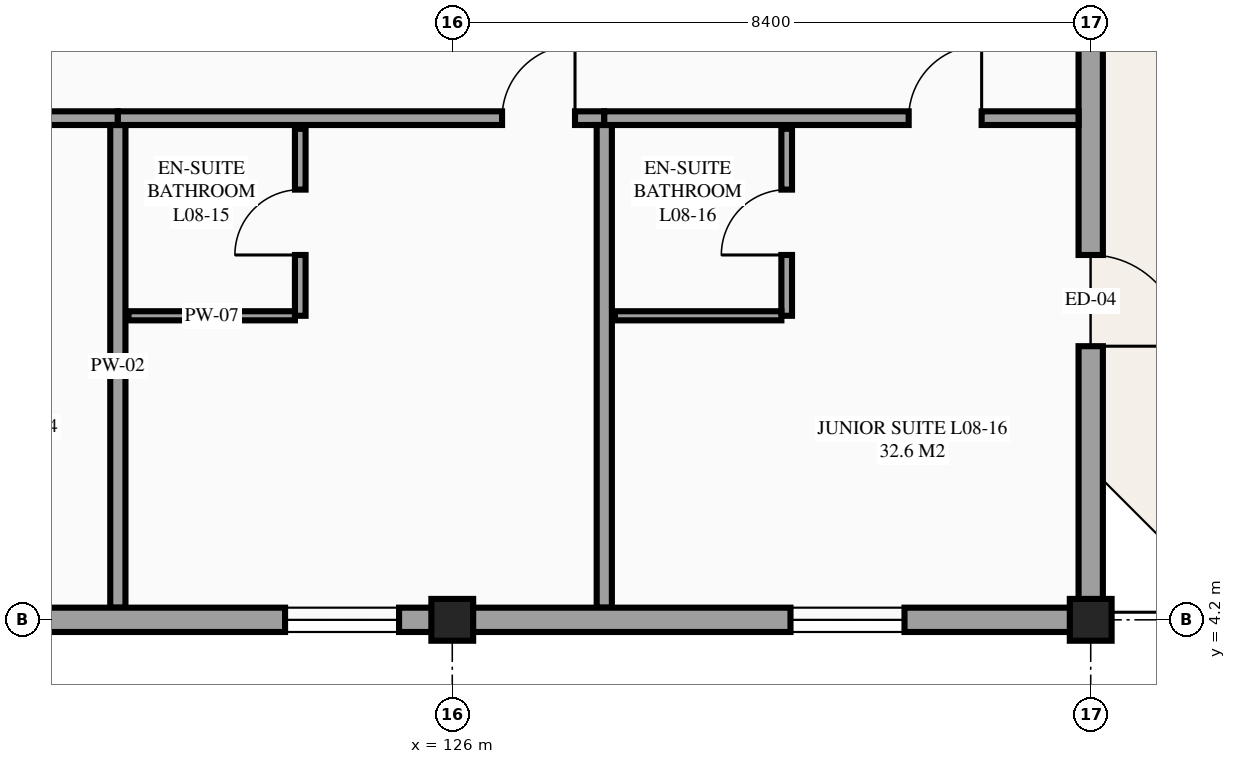
"""IFC4 building model, lengths in metres.
Left out: names, types, materials, properties, quantities, classifications, styles, units other than length and angle.
Written with IfcOpenShell. Run it as: python <this file> out.ifc"""

import sys

from ifc_helpers import new_model, si_unit, direction, frame, frame_2d, origin, origin_2d, place, context, subcontext, project, spatial, rectangle, extrude, element, fill, save


model = new_model("IFC4")
c1 = context("Model", 3, precision=1e-05, world=origin(), true_north=direction((0.0, 1.0)))
c2 = subcontext(c1, "Body", "Model", "MODEL_VIEW")
j1 = project(units=[si_unit("LENGTHUNIT", "METRE"), si_unit("PLANEANGLEUNIT", "RADIAN")], contexts=[c1])
p1 = place(None, origin())
s1 = spatial("IfcSite", under=j1, at=p1, CompositionType="ELEMENT")
p2 = place(p1, origin())
s2 = spatial("IfcBuilding", under=s1, at=p2, CompositionType="ELEMENT")
p3 = place(p2, frame((0.0, 0.0, 32.7)))
s3 = spatial("IfcBuildingStorey", under=s2, at=p3, CompositionType="ELEMENT", Elevation=32.7)
for number, where, z_axis, x_axis in (
    (1, (126.0, 4.2, 0.0), (0.0, 0.0, 1.0), (1.0, 0.0, 0.0)),
    (2, (134.4, 4.2, 0.0), (0.0, 0.0, 1.0), (1.0, 0.0, 0.0)),
):
    element("IfcColumn", number, at=place(p3, frame(where, z_axis=z_axis, x_axis=x_axis)), inside=s3, PredefinedType="COLUMN", context=c2, shape_type="SweptSolid", body=[
        extrude(rectangle(XDim=0.55, YDim=0.55, at=origin_2d()), origin(), (0.0, 0.0, 1.0), 3.6),
    ])
p4 = place(p3, frame((134.4, 4.2, 0.0), z_axis=(0.0, 0.0, 1.0), x_axis=(0.0, 1.0, 0.0)))
e3 = element("IfcWall", 3, at=p4, inside=s3, PredefinedType="STANDARD", context=c2, shape_type="SweptSolid", body=[
    extrude(rectangle(XDim=16.8, YDim=0.32, at=frame_2d((8.4, 0.0))), origin(), (0.0, 0.0, 1.0), 2.63),
])
p5 = place(p4, frame((4.8, 0.0, 0.0), z_axis=(0.0, 0.0, 1.0), x_axis=(-1.0, 0.0, 0.0)))
e4 = element("IfcOpeningElement", 4, at=p5, cuts=e3, PredefinedType="OPENING", context=c2, shape_type="SweptSolid", body=[
    extrude(rectangle(XDim=1.2, YDim=2.2, at=frame_2d((0.6, 1.1))), frame((0.0, 0.17, 0.0), z_axis=(0.0, -1.0, 0.0), x_axis=(1.0, 0.0, 0.0)), (0.0, 0.0, 1.0), 0.34),
])
p6 = place(p3, frame((115.2, 10.8, 0.0), z_axis=(0.0, 0.0, 1.0), x_axis=(1.0, 0.0, 0.0)))
e5 = element("IfcWall", 5, at=p6, inside=s3, PredefinedType="PARTITIONING", context=c2, shape_type="SweptSolid", body=[
    extrude(rectangle(XDim=6.4, YDim=0.18, at=frame_2d((3.2, 0.0))), origin(), (0.0, 0.0, 1.0), 3.375),
])
p7 = place(p6, frame((4.355, 0.0, 0.0)))
e6 = element("IfcOpeningElement", 6, at=p7, cuts=e5, PredefinedType="OPENING", context=c2, shape_type="SweptSolid", body=[
    extrude(rectangle(XDim=0.96, YDim=2.15, at=frame_2d((0.48, 1.075))), frame((0.0, 0.1, 0.0), z_axis=(0.0, -1.0, 0.0), x_axis=(1.0, 0.0, 0.0)), (0.0, 0.0, 1.0), 0.2),
])
p8 = place(p3, frame((121.6, 4.36, 0.0), z_axis=(0.0, 0.0, 1.0), x_axis=(0.0, 1.0, 0.0)))
e7 = element("IfcWall", 7, at=p8, inside=s3, PredefinedType="PARTITIONING", context=c2, shape_type="SweptSolid", body=[
    extrude(rectangle(XDim=6.35, YDim=0.2, at=frame_2d((3.175, 0.0))), origin(), (0.0, 0.0, 1.0), 3.375),
])
p9 = place(p3, frame((121.6, 10.8, 0.0), z_axis=(0.0, 0.0, 1.0), x_axis=(1.0, 0.0, 0.0)))
e8 = element("IfcWall", 8, at=p9, inside=s3, PredefinedType="PARTITIONING", context=c2, shape_type="SweptSolid", body=[
    extrude(rectangle(XDim=6.4, YDim=0.18, at=frame_2d((3.2, 0.0))), origin(), (0.0, 0.0, 1.0), 3.375),
])
p10 = place(p9, frame((5.055, 0.0, 0.0)))
e9 = element("IfcOpeningElement", 9, at=p10, cuts=e8, PredefinedType="OPENING", context=c2, shape_type="SweptSolid", body=[
    extrude(rectangle(XDim=0.96, YDim=2.15, at=frame_2d((0.48, 1.075))), frame((0.0, 0.1, 0.0), z_axis=(0.0, -1.0, 0.0), x_axis=(1.0, 0.0, 0.0)), (0.0, 0.0, 1.0), 0.2),
])
p11 = place(p3, frame((128.0, 4.36, 0.0), z_axis=(0.0, 0.0, 1.0), x_axis=(0.0, 1.0, 0.0)))
e10 = element("IfcWall", 10, at=p11, inside=s3, PredefinedType="PARTITIONING", context=c2, shape_type="SweptSolid", body=[
    extrude(rectangle(XDim=6.35, YDim=0.2, at=frame_2d((3.175, 0.0))), origin(), (0.0, 0.0, 1.0), 3.375),
])
p12 = place(p3, frame((124.0, 8.2, 0.0), z_axis=(0.0, 0.0, 1.0), x_axis=(0.0, 1.0, 0.0)))
e11 = element("IfcWall", 11, at=p12, inside=s3, PredefinedType="PARTITIONING", context=c2, shape_type="SweptSolid", body=[
    extrude(rectangle(XDim=2.46, YDim=0.14, at=frame_2d((1.23, 0.0))), origin(), (0.0, 0.0, 1.0), 3.375),
])
p13 = place(p12, frame((0.8, 0.0, 0.0)))
e12 = element("IfcOpeningElement", 12, at=p13, cuts=e11, PredefinedType="OPENING", context=c2, shape_type="SweptSolid", body=[
    extrude(rectangle(XDim=0.86, YDim=2.1, at=frame_2d((0.43, 1.05))), frame((0.0, 0.08, 0.0), z_axis=(0.0, -1.0, 0.0), x_axis=(1.0, 0.0, 0.0)), (0.0, 0.0, 1.0), 0.16),
])
p14 = place(p3, frame((121.74, 8.2, 0.0), z_axis=(0.0, 0.0, 1.0), x_axis=(1.0, 0.0, 0.0)))
e13 = element("IfcWall", 13, at=p14, inside=s3, PredefinedType="PARTITIONING", context=c2, shape_type="SweptSolid", body=[
    extrude(rectangle(XDim=2.19, YDim=0.12, at=frame_2d((1.095, 0.0))), origin(), (0.0, 0.0, 1.0), 3.375),
])
p15 = place(p3, frame((128.0, 10.8, 0.0), z_axis=(0.0, 0.0, 1.0), x_axis=(1.0, 0.0, 0.0)))
e14 = element("IfcWall", 14, at=p15, inside=s3, PredefinedType="PARTITIONING", context=c2, shape_type="SweptSolid", body=[
    extrude(rectangle(XDim=6.24, YDim=0.18, at=frame_2d((3.12, 0.0))), origin(), (0.0, 0.0, 1.0), 3.375),
])
p16 = place(p15, frame((4.005, 0.0, 0.0)))
e15 = element("IfcOpeningElement", 15, at=p16, cuts=e14, PredefinedType="OPENING", context=c2, shape_type="SweptSolid", body=[
    extrude(rectangle(XDim=0.96, YDim=2.15, at=frame_2d((0.48, 1.075))), frame((0.0, 0.1, 0.0), z_axis=(0.0, -1.0, 0.0), x_axis=(1.0, 0.0, 0.0)), (0.0, 0.0, 1.0), 0.2),
])
p17 = place(p3, frame((130.4, 8.2, 0.0), z_axis=(0.0, 0.0, 1.0), x_axis=(0.0, 1.0, 0.0)))
e16 = element("IfcWall", 16, at=p17, inside=s3, PredefinedType="PARTITIONING", context=c2, shape_type="SweptSolid", body=[
    extrude(rectangle(XDim=2.46, YDim=0.14, at=frame_2d((1.23, 0.0))), origin(), (0.0, 0.0, 1.0), 3.375),
])
p18 = place(p17, frame((0.8, 0.0, 0.0)))
e17 = element("IfcOpeningElement", 17, at=p18, cuts=e16, PredefinedType="OPENING", context=c2, shape_type="SweptSolid", body=[
    extrude(rectangle(XDim=0.86, YDim=2.1, at=frame_2d((0.43, 1.05))), frame((0.0, 0.08, 0.0), z_axis=(0.0, -1.0, 0.0), x_axis=(1.0, 0.0, 0.0)), (0.0, 0.0, 1.0), 0.16),
])
p19 = place(p3, frame((128.14, 8.2, 0.0), z_axis=(0.0, 0.0, 1.0), x_axis=(1.0, 0.0, 0.0)))
e18 = element("IfcWall", 18, at=p19, inside=s3, PredefinedType="PARTITIONING", context=c2, shape_type="SweptSolid", body=[
    extrude(rectangle(XDim=2.19, YDim=0.12, at=frame_2d((1.095, 0.0))), origin(), (0.0, 0.0, 1.0), 3.375),
])
p20 = place(p3, frame((117.6, 4.2, 0.0), z_axis=(0.0, 0.0, 1.0), x_axis=(1.0, 0.0, 0.0)))
e19 = element("IfcWall", 19, at=p20, inside=s3, PredefinedType="STANDARD", context=c2, shape_type="SweptSolid", body=[
    extrude(rectangle(XDim=8.4, YDim=0.32, at=frame_2d((4.2, 0.0))), origin(), (0.0, 0.0, 1.0), 3.133),
])
p21 = place(p20, frame((0.8, 0.0, 0.85)))
e20 = element("IfcOpeningElement", 20, at=p21, cuts=e19, PredefinedType="OPENING", context=c2, shape_type="SweptSolid", body=[
    extrude(rectangle(XDim=1.5, YDim=1.5, at=frame_2d((0.75, 0.75))), frame((0.0, 0.17, 0.0), z_axis=(0.0, -1.0, 0.0), x_axis=(1.0, 0.0, 0.0)), (0.0, 0.0, 1.0), 0.34),
])
p22 = place(p20, frame((6.2, 0.0, 0.85)))
e21 = element("IfcOpeningElement", 21, at=p22, cuts=e19, PredefinedType="OPENING", context=c2, shape_type="SweptSolid", body=[
    extrude(rectangle(XDim=1.5, YDim=1.5, at=frame_2d((0.75, 0.75))), frame((0.0, 0.17, 0.0), z_axis=(0.0, -1.0, 0.0), x_axis=(1.0, 0.0, 0.0)), (0.0, 0.0, 1.0), 0.34),
])
p23 = place(p3, frame((126.0, 4.2, 0.0), z_axis=(0.0, 0.0, 1.0), x_axis=(1.0, 0.0, 0.0)))
e22 = element("IfcWall", 22, at=p23, inside=s3, PredefinedType="STANDARD", context=c2, shape_type="SweptSolid", body=[
    extrude(rectangle(XDim=8.4, YDim=0.32, at=frame_2d((4.2, 0.0))), origin(), (0.0, 0.0, 1.0), 2.68),
])
p24 = place(p23, frame((4.45, 0.0, 0.85)))
e23 = element("IfcOpeningElement", 23, at=p24, cuts=e22, PredefinedType="OPENING", context=c2, shape_type="SweptSolid", body=[
    extrude(rectangle(XDim=1.5, YDim=1.5, at=frame_2d((0.75, 0.75))), frame((0.0, 0.17, 0.0), z_axis=(0.0, -1.0, 0.0), x_axis=(1.0, 0.0, 0.0)), (0.0, 0.0, 1.0), 0.34),
])
p25 = place(p22, origin())
e24 = element("IfcWindow", 24, at=p25, inside=s3, PartitioningType="SINGLE_PANEL", PredefinedType="WINDOW", context=c2, shape_type="SweptSolid", body=[
    extrude(rectangle(XDim=1.5, YDim=1.5, at=frame_2d((0.75, 0.75))), frame((0.0, 0.03, 0.0), z_axis=(0.0, -1.0, 0.0), x_axis=(1.0, 0.0, 0.0)), (0.0, 0.0, 1.0), 0.06),
])
fill(e21, e24)
p26 = place(p24, origin())
e25 = element("IfcWindow", 25, at=p26, inside=s3, PartitioningType="SINGLE_PANEL", PredefinedType="WINDOW", context=c2, shape_type="SweptSolid", body=[
    extrude(rectangle(XDim=1.5, YDim=1.5, at=frame_2d((0.75, 0.75))), frame((0.0, 0.03, 0.0), z_axis=(0.0, -1.0, 0.0), x_axis=(1.0, 0.0, 0.0)), (0.0, 0.0, 1.0), 0.06),
])
fill(e23, e25)
p27 = place(p5, origin())
e26 = element("IfcDoor", 26, at=p27, inside=s3, OperationType="SINGLE_SWING_LEFT", PredefinedType="DOOR", context=c2, shape_type="SweptSolid", body=[
    extrude(rectangle(XDim=1.2, YDim=2.2, at=frame_2d((0.6, 1.1))), frame((0.0, 0.025, 0.0), z_axis=(0.0, -1.0, 0.0), x_axis=(1.0, 0.0, 0.0)), (0.0, 0.0, 1.0), 0.05),
])
fill(e4, e26)
p28 = place(p10, origin())
e27 = element("IfcDoor", 27, at=p28, inside=s3, OperationType="SINGLE_SWING_RIGHT", PredefinedType="DOOR", context=c2, shape_type="SweptSolid", body=[
    extrude(rectangle(XDim=0.96, YDim=2.15, at=frame_2d((0.48, 1.075))), frame((0.0, 0.025, 0.0), z_axis=(0.0, -1.0, 0.0), x_axis=(1.0, 0.0, 0.0)), (0.0, 0.0, 1.0), 0.05),
])
fill(e9, e27)
p29 = place(p13, origin())
e28 = element("IfcDoor", 28, at=p29, inside=s3, OperationType="SINGLE_SWING_LEFT", PredefinedType="DOOR", context=c2, shape_type="SweptSolid", body=[
    extrude(rectangle(XDim=0.86, YDim=2.1, at=frame_2d((0.43, 1.05))), frame((0.0, 0.025, 0.0), z_axis=(0.0, -1.0, 0.0), x_axis=(1.0, 0.0, 0.0)), (0.0, 0.0, 1.0), 0.05),
])
fill(e12, e28)
p30 = place(p16, origin())
e29 = element("IfcDoor", 29, at=p30, inside=s3, OperationType="SINGLE_SWING_RIGHT", PredefinedType="DOOR", context=c2, shape_type="SweptSolid", body=[
    extrude(rectangle(XDim=0.96, YDim=2.15, at=frame_2d((0.48, 1.075))), frame((0.0, 0.025, 0.0), z_axis=(0.0, -1.0, 0.0), x_axis=(1.0, 0.0, 0.0)), (0.0, 0.0, 1.0), 0.05),
])
fill(e15, e29)
p31 = place(p18, origin())
e30 = element("IfcDoor", 30, at=p31, inside=s3, OperationType="SINGLE_SWING_LEFT", PredefinedType="DOOR", context=c2, shape_type="SweptSolid", body=[
    extrude(rectangle(XDim=0.86, YDim=2.1, at=frame_2d((0.43, 1.05))), frame((0.0, 0.025, 0.0), z_axis=(0.0, -1.0, 0.0), x_axis=(1.0, 0.0, 0.0)), (0.0, 0.0, 1.0), 0.05),
])
fill(e17, e30)
save(model, sys.argv[1])
